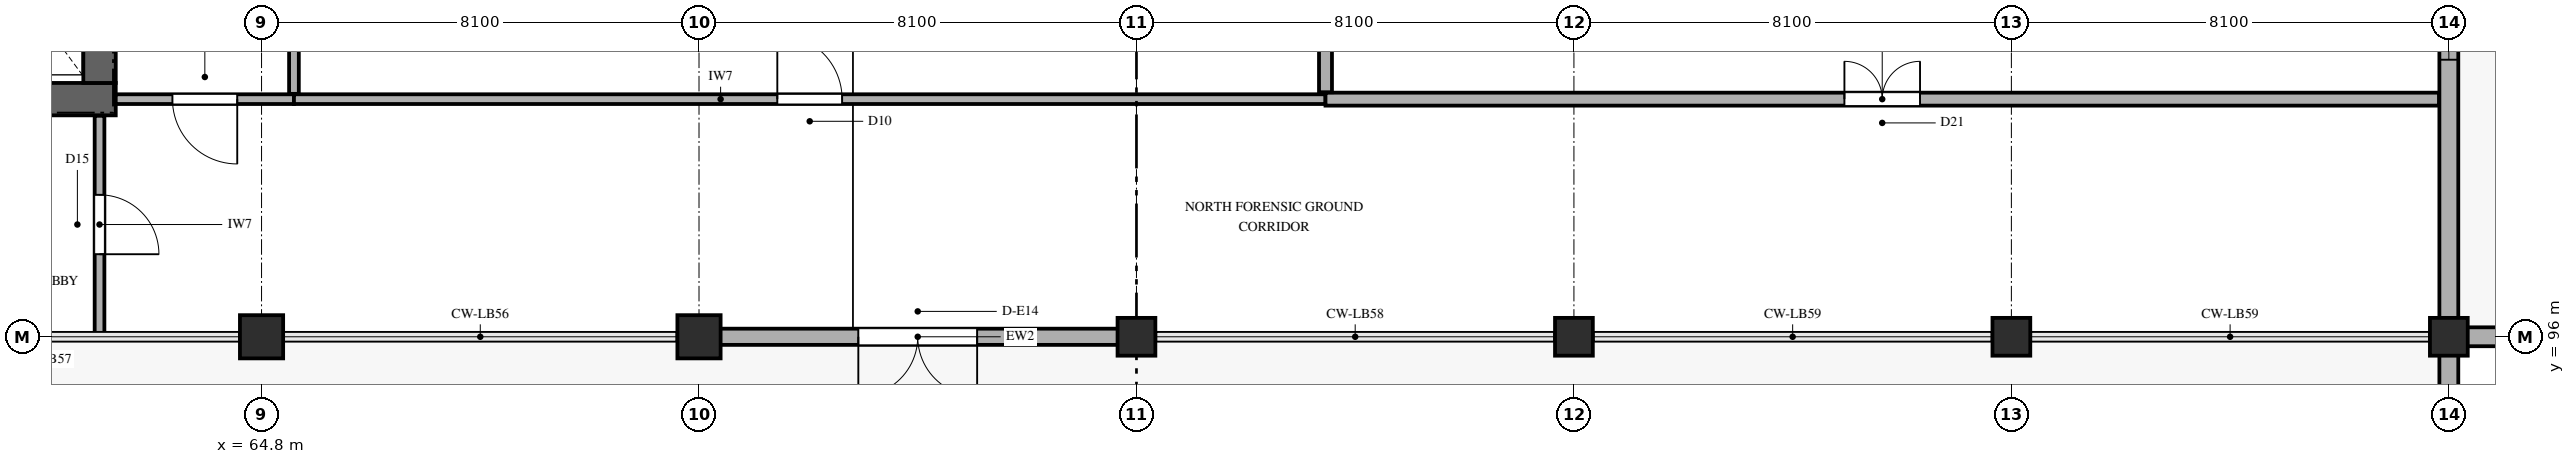
"""IFC4 building model, lengths in metres.
Left out: names, types, materials, properties, quantities, classifications, styles, units other than length and angle.
Written with IfcOpenShell. Run it as: python <this file> out.ifc"""

import sys

from ifc_helpers import new_model, si_unit, direction, frame, frame_2d, origin, origin_2d, place, context, subcontext, project, spatial, rectangle, extrude, element, fill, save


model = new_model("IFC4")
c1 = context("Model", 3, precision=1e-05, world=origin(), true_north=direction((0.0, 1.0)))
c2 = subcontext(c1, "Body", "Model", "MODEL_VIEW")
j1 = project(units=[si_unit("LENGTHUNIT", "METRE"), si_unit("PLANEANGLEUNIT", "RADIAN")], contexts=[c1])
p1 = place(None, origin())
s1 = spatial("IfcSite", under=j1, at=p1, CompositionType="ELEMENT")
p2 = place(p1, origin())
s2 = spatial("IfcBuilding", under=s1, at=p2, CompositionType="ELEMENT")
p3 = place(p2, origin())
s3 = spatial("IfcBuildingStorey", under=s2, at=p3, CompositionType="ELEMENT", Elevation=0.0)
p4 = place(p3, frame((46.7, 100.4, 0.0), z_axis=(0.0, 0.0, 1.0), x_axis=(1.0, 0.0, 0.0)))
e1 = element("IfcWall", 1, at=p4, inside=s3, PredefinedType="SHEAR", context=c2, shape_type="SweptSolid", body=[
    extrude(rectangle(XDim=15.4, YDim=0.6, at=frame_2d((7.7, 0.0))), origin(), (0.0, 0.0, 1.0), 5.4),
])
p5 = place(p4, frame((1.05, 0.0, 0.0)))
e2 = element("IfcOpeningElement", 2, at=p5, cuts=e1, PredefinedType="OPENING", context=c2, shape_type="SweptSolid", body=[
    extrude(rectangle(XDim=1.15, YDim=2.25, at=frame_2d((0.575, 1.125))), frame((0.0, 0.31, 0.0), z_axis=(0.0, -1.0, 0.0), x_axis=(1.0, 0.0, 0.0)), (0.0, 0.0, 1.0), 0.62),
])
p6 = place(p4, frame((10.333, 0.0, 0.0)))
e3 = element("IfcOpeningElement", 3, at=p6, cuts=e1, PredefinedType="OPENING", context=c2, shape_type="SweptSolid", body=[
    extrude(rectangle(XDim=1.1, YDim=2.2, at=frame_2d((0.55, 1.1))), frame((0.0, 0.31, 0.0), z_axis=(0.0, -1.0, 0.0), x_axis=(1.0, 0.0, 0.0)), (0.0, 0.0, 1.0), 0.62),
])
p7 = place(p4, frame((13.048, 0.0, 0.0)))
e4 = element("IfcOpeningElement", 4, at=p7, cuts=e1, PredefinedType="OPENING", context=c2, shape_type="SweptSolid", body=[
    extrude(rectangle(XDim=1.1, YDim=2.2, at=frame_2d((0.55, 1.1))), frame((0.0, 0.31, 0.0), z_axis=(0.0, -1.0, 0.0), x_axis=(1.0, 0.0, 0.0)), (0.0, 0.0, 1.0), 0.62),
])
p8 = place(p3, frame((61.8, 100.7, 0.0), z_axis=(0.0, 0.0, 1.0), x_axis=(0.0, 1.0, 0.0)))
e5 = element("IfcWall", 5, at=p8, inside=s3, PredefinedType="SHEAR", context=c2, shape_type="SweptSolid", body=[
    extrude(rectangle(XDim=7.8, YDim=0.6, at=frame_2d((3.9, 0.0))), origin(), (0.0, 0.0, 1.0), 5.4),
])
for number, where, z_axis, x_axis in (
    (6, (64.8, 96.0, 0.0), (0.0, 0.0, 1.0), (1.0, 0.0, 0.0)),
    (7, (72.9, 96.0, 0.0), (0.0, 0.0, 1.0), (1.0, 0.0, 0.0)),
):
    element("IfcColumn", number, at=place(p3, frame(where, z_axis=z_axis, x_axis=x_axis)), inside=s3, PredefinedType="COLUMN", context=c2, shape_type="SweptSolid", body=[
        extrude(rectangle(XDim=0.8, YDim=0.8, at=origin_2d()), origin(), (0.0, 0.0, 1.0), 5.4),
    ])
for number, where, z_axis, x_axis in (
    (8, (81.0, 96.0, 0.0), (0.0, 0.0, 1.0), (1.0, 0.0, 0.0)),
    (9, (89.1, 96.0, 0.0), (0.0, 0.0, 1.0), (1.0, 0.0, 0.0)),
    (10, (97.2, 96.0, 0.0), (0.0, 0.0, 1.0), (1.0, 0.0, 0.0)),
    (11, (105.3, 96.0, 0.0), (0.0, 0.0, 1.0), (1.0, 0.0, 0.0)),
):
    element("IfcColumn", number, at=place(p3, frame(where, z_axis=z_axis, x_axis=x_axis)), inside=s3, PredefinedType="COLUMN", context=c2, shape_type="SweptSolid", body=[
        extrude(rectangle(XDim=0.7, YDim=0.7, at=origin_2d()), origin(), (0.0, 0.0, 1.0), 5.4),
    ])
p9 = place(p3, frame((73.08, 96.0, 0.0), z_axis=(0.0, 0.0, 1.0), x_axis=(1.0, 0.0, 0.0)))
e12 = element("IfcWall", 12, at=p9, inside=s3, PredefinedType="SOLIDWALL", context=c2, shape_type="SweptSolid", body=[
    extrude(rectangle(XDim=7.74, YDim=0.3, at=frame_2d((3.87, 0.0))), origin(), (0.0, 0.0, 1.0), 4.412),
])
p10 = place(p9, frame((2.77, 0.0, 0.0)))
e13 = element("IfcOpeningElement", 13, at=p10, cuts=e12, PredefinedType="OPENING", context=c2, shape_type="SweptSolid", body=[
    extrude(rectangle(XDim=2.2, YDim=2.6, at=frame_2d((1.1, 1.3))), frame((0.0, 0.16, 0.0), z_axis=(0.0, -1.0, 0.0), x_axis=(1.0, 0.0, 0.0)), (0.0, 0.0, 1.0), 0.32),
])
p11 = place(p3, frame((105.3, 96.18, 0.0), z_axis=(0.0, 0.0, 1.0), x_axis=(0.0, 1.0, 0.0)))
e14 = element("IfcWall", 14, at=p11, inside=s3, PredefinedType="SOLIDWALL", context=c2, shape_type="SweptSolid", body=[
    extrude(rectangle(XDim=15.82, YDim=0.35, at=frame_2d((7.91, 0.0))), origin(), (0.0, 0.0, 1.0), 4.512),
])
p12 = place(p11, frame((4.95, 0.0, 0.95)))
e15 = element("IfcOpeningElement", 15, at=p12, cuts=e14, PredefinedType="OPENING", context=c2, shape_type="SweptSolid", body=[
    extrude(rectangle(XDim=1.2, YDim=1.8, at=frame_2d((0.6, 0.9))), frame((0.0, 0.185, 0.0), z_axis=(0.0, -1.0, 0.0), x_axis=(1.0, 0.0, 0.0)), (0.0, 0.0, 1.0), 0.37),
])
p13 = place(p3, frame((117.54, 96.0, 0.0), z_axis=(0.0, 0.0, 1.0), x_axis=(-1.0, 0.0, 0.0)))
e16 = element("IfcWall", 16, at=p13, inside=s3, PredefinedType="SOLIDWALL", context=c2, shape_type="SweptSolid", body=[
    extrude(rectangle(XDim=12.06, YDim=0.35, at=frame_2d((6.03, 0.0))), origin(), (0.0, 0.0, 1.0), 4.424),
])
p14 = place(p13, frame((5.939, 0.0, 0.0)))
e17 = element("IfcOpeningElement", 17, at=p14, cuts=e16, PredefinedType="OPENING", context=c2, shape_type="SweptSolid", body=[
    extrude(rectangle(XDim=3.8, YDim=3.4, at=frame_2d((1.9, 1.7))), frame((0.0, 0.185, 0.0), z_axis=(0.0, -1.0, 0.0), x_axis=(1.0, 0.0, 0.0)), (0.0, 0.0, 1.0), 0.37),
])
p15 = place(p3, frame((105.3, 95.82, 0.0), z_axis=(0.0, 0.0, 1.0), x_axis=(0.0, -1.0, 0.0)))
e18 = element("IfcWall", 18, at=p15, inside=s3, PredefinedType="SOLIDWALL", context=c2, shape_type="SweptSolid", body=[
    extrude(rectangle(XDim=13.273, YDim=0.35, at=frame_2d((6.637, 0.0))), origin(), (0.0, 0.0, 1.0), 4.512),
])
p16 = place(p3, frame((62.1, 100.4, 0.0), z_axis=(0.0, 0.0, 1.0), x_axis=(1.0, 0.0, 0.0)))
e19 = element("IfcWall", 19, at=p16, inside=s3, PredefinedType="PARTITIONING", context=c2, shape_type="SweptSolid", body=[
    extrude(rectangle(XDim=3.3, YDim=0.18, at=frame_2d((1.65, 0.0))), origin(), (0.0, 0.0, 1.0), 5.12),
])
p17 = place(p16, frame((1.05, 0.0, 0.0)))
e20 = element("IfcOpeningElement", 20, at=p17, cuts=e19, PredefinedType="OPENING", context=c2, shape_type="SweptSolid", body=[
    extrude(rectangle(XDim=1.2, YDim=2.2, at=frame_2d((0.6, 1.1))), frame((0.0, 0.1, 0.0), z_axis=(0.0, -1.0, 0.0), x_axis=(1.0, 0.0, 0.0)), (0.0, 0.0, 1.0), 0.2),
])
p18 = place(p3, frame((65.4, 100.4, 0.0), z_axis=(0.0, 0.0, 1.0), x_axis=(1.0, 0.0, 0.0)))
e21 = element("IfcWall", 21, at=p18, inside=s3, PredefinedType="PARTITIONING", context=c2, shape_type="SweptSolid", body=[
    extrude(rectangle(XDim=19.1, YDim=0.18, at=frame_2d((9.55, 0.0))), origin(), (0.0, 0.0, 1.0), 5.12),
])
p19 = place(p18, frame((8.95, 0.0, 0.0)))
e22 = element("IfcOpeningElement", 22, at=p19, cuts=e21, PredefinedType="OPENING", context=c2, shape_type="SweptSolid", body=[
    extrude(rectangle(XDim=1.2, YDim=2.3, at=frame_2d((0.6, 1.15))), frame((0.0, 0.1, 0.0), z_axis=(0.0, -1.0, 0.0), x_axis=(1.0, 0.0, 0.0)), (0.0, 0.0, 1.0), 0.2),
])
p20 = place(p3, frame((84.5, 100.4, 0.0), z_axis=(0.0, 0.0, 1.0), x_axis=(1.0, 0.0, 0.0)))
e23 = element("IfcWall", 23, at=p20, inside=s3, PredefinedType="PARTITIONING", context=c2, shape_type="SweptSolid", body=[
    extrude(rectangle(XDim=20.617, YDim=0.24, at=frame_2d((10.309, 0.0))), origin(), (0.0, 0.0, 1.0), 5.12),
])
p21 = place(p20, frame((9.608, 0.0, 0.0)))
e24 = element("IfcOpeningElement", 24, at=p21, cuts=e23, PredefinedType="OPENING", context=c2, shape_type="SweptSolid", body=[
    extrude(rectangle(XDim=1.4, YDim=2.35, at=frame_2d((0.7, 1.175))), frame((0.0, 0.13, 0.0), z_axis=(0.0, -1.0, 0.0), x_axis=(1.0, 0.0, 0.0)), (0.0, 0.0, 1.0), 0.26),
])
p22 = place(p3, frame((61.8, 96.065, 0.0), z_axis=(0.0, 0.0, 1.0), x_axis=(0.0, 1.0, 0.0)))
e25 = element("IfcWall", 25, at=p22, inside=s3, PredefinedType="PARTITIONING", context=c2, shape_type="SweptSolid", body=[
    extrude(rectangle(XDim=4.027, YDim=0.18, at=frame_2d((2.014, 0.0))), origin(), (0.0, 0.0, 1.0), 5.12),
])
p23 = place(p22, frame((1.463, 0.0, 0.0)))
e26 = element("IfcOpeningElement", 26, at=p23, cuts=e25, PredefinedType="OPENING", context=c2, shape_type="SweptSolid", body=[
    extrude(rectangle(XDim=1.1, YDim=2.2, at=frame_2d((0.55, 1.1))), frame((0.0, 0.1, 0.0), z_axis=(0.0, -1.0, 0.0), x_axis=(1.0, 0.0, 0.0)), (0.0, 0.0, 1.0), 0.2),
])
p24 = place(p3, frame((65.4, 100.498, 0.0), z_axis=(0.0, 0.0, 1.0), x_axis=(0.0, 1.0, 0.0)))
e27 = element("IfcWall", 27, at=p24, inside=s3, PredefinedType="PARTITIONING", context=c2, shape_type="SweptSolid", body=[
    extrude(rectangle(XDim=5.672, YDim=0.18, at=frame_2d((2.836, 0.0))), origin(), (0.0, 0.0, 1.0), 5.12),
])
p25 = place(p3, frame((84.5, 100.528, 0.0), z_axis=(0.0, 0.0, 1.0), x_axis=(0.0, 1.0, 0.0)))
e28 = element("IfcWall", 28, at=p25, inside=s3, PredefinedType="PARTITIONING", context=c2, shape_type="SweptSolid", body=[
    extrude(rectangle(XDim=5.657, YDim=0.24, at=frame_2d((2.829, 0.0))), origin(), (0.0, 0.0, 1.0), 5.12),
])
p26 = place(p10, frame((2.2, 0.0, 0.0), z_axis=(0.0, 0.0, 1.0), x_axis=(-1.0, 0.0, 0.0)))
e29 = element("IfcDoor", 29, at=p26, inside=s3, OperationType="DOUBLE_DOOR_SINGLE_SWING", PredefinedType="DOOR", context=c2, shape_type="SweptSolid", body=[
    extrude(rectangle(XDim=2.2, YDim=2.6, at=frame_2d((1.1, 1.3))), frame((0.0, 0.025, 0.0), z_axis=(0.0, -1.0, 0.0), x_axis=(1.0, 0.0, 0.0)), (0.0, 0.0, 1.0), 0.05),
])
fill(e13, e29)
p27 = place(p12, origin())
e30 = element("IfcWindow", 30, at=p27, inside=s3, PartitioningType="SINGLE_PANEL", PredefinedType="WINDOW", context=c2, shape_type="SweptSolid", body=[
    extrude(rectangle(XDim=1.2, YDim=1.8, at=frame_2d((0.6, 0.9))), frame((0.0, 0.03, 0.0), z_axis=(0.0, -1.0, 0.0), x_axis=(1.0, 0.0, 0.0)), (0.0, 0.0, 1.0), 0.06),
])
fill(e15, e30)
p28 = place(p17, frame((1.2, 0.0, 0.0), z_axis=(0.0, 0.0, 1.0), x_axis=(-1.0, 0.0, 0.0)))
e31 = element("IfcDoor", 31, at=p28, inside=s3, OperationType="SINGLE_SWING_RIGHT", PredefinedType="DOOR", context=c2, shape_type="SweptSolid", body=[
    extrude(rectangle(XDim=1.2, YDim=2.2, at=frame_2d((0.6, 1.1))), frame((0.0, 0.025, 0.0), z_axis=(0.0, -1.0, 0.0), x_axis=(1.0, 0.0, 0.0)), (0.0, 0.0, 1.0), 0.05),
])
fill(e20, e31)
p29 = place(p19, origin())
e32 = element("IfcDoor", 32, at=p29, inside=s3, OperationType="SINGLE_SWING_LEFT", PredefinedType="DOOR", context=c2, shape_type="SweptSolid", body=[
    extrude(rectangle(XDim=1.2, YDim=2.3, at=frame_2d((0.6, 1.15))), frame((0.0, 0.025, 0.0), z_axis=(0.0, -1.0, 0.0), x_axis=(1.0, 0.0, 0.0)), (0.0, 0.0, 1.0), 0.05),
])
fill(e22, e32)
p30 = place(p21, origin())
e33 = element("IfcDoor", 33, at=p30, inside=s3, OperationType="DOUBLE_DOOR_SINGLE_SWING", PredefinedType="DOOR", context=c2, shape_type="SweptSolid", body=[
    extrude(rectangle(XDim=1.4, YDim=2.35, at=frame_2d((0.7, 1.175))), frame((0.0, 0.025, 0.0), z_axis=(0.0, -1.0, 0.0), x_axis=(1.0, 0.0, 0.0)), (0.0, 0.0, 1.0), 0.05),
])
fill(e24, e33)
p31 = place(p23, frame((1.1, 0.0, 0.0), z_axis=(0.0, 0.0, 1.0), x_axis=(-1.0, 0.0, 0.0)))
e34 = element("IfcDoor", 34, at=p31, inside=s3, OperationType="SINGLE_SWING_LEFT", PredefinedType="DOOR", context=c2, shape_type="SweptSolid", body=[
    extrude(rectangle(XDim=1.1, YDim=2.2, at=frame_2d((0.55, 1.1))), frame((0.0, 0.025, 0.0), z_axis=(0.0, -1.0, 0.0), x_axis=(1.0, 0.0, 0.0)), (0.0, 0.0, 1.0), 0.05),
])
fill(e26, e34)
save(model, sys.argv[1])
